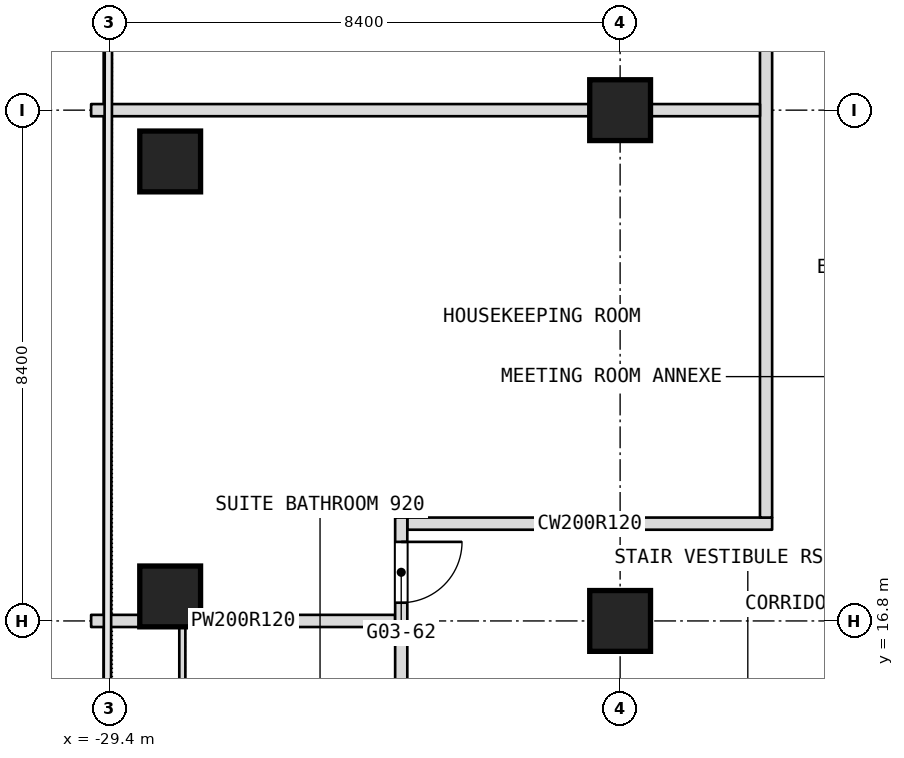
"""IFC4 building model, lengths in metres.
Left out: names, types, materials, properties, quantities, classifications, styles, units other than length and angle.
Written with IfcOpenShell. Run it as: python <this file> out.ifc"""

import sys

from ifc_helpers import new_model, si_unit, direction, frame, frame_2d, origin, origin_2d, place, context, subcontext, project, spatial, rectangle, extrude, element, fill, save


model = new_model("IFC4")
c1 = context("Model", 3, precision=1e-05, world=origin(), true_north=direction((0.0, 1.0)))
c2 = subcontext(c1, "Body", "Model", "MODEL_VIEW")
j1 = project(units=[si_unit("LENGTHUNIT", "METRE"), si_unit("PLANEANGLEUNIT", "RADIAN")], contexts=[c1])
p1 = place(None, origin())
s1 = spatial("IfcSite", under=j1, at=p1, CompositionType="ELEMENT")
p2 = place(p1, origin())
s2 = spatial("IfcBuilding", under=s1, at=p2, CompositionType="ELEMENT")
p3 = place(p2, frame((0.0, 0.0, 47.3)))
s3 = spatial("IfcBuildingStorey", under=s2, at=p3, CompositionType="ELEMENT", Elevation=47.3)
for number, where, z_axis, x_axis in (
    (1, (-21.0, 16.8, 0.0), (0.0, 0.0, 1.0), (1.0, 0.0, 0.0)),
    (2, (-21.0, 25.2, 0.0), (0.0, 0.0, 1.0), (1.0, 0.0, 0.0)),
    (3, (-28.4, 17.203, 0.0), (0.0, 0.0, 1.0), (1.0, 0.0, 0.0)),
    (4, (-28.4, 24.356, 0.0), (0.0, 0.0, 1.0), (1.0, 0.0, 0.0)),
):
    element("IfcColumn", number, at=place(p3, frame(where, z_axis=z_axis, x_axis=x_axis)), inside=s3, PredefinedType="COLUMN", context=c2, shape_type="SweptSolid", body=[
        extrude(rectangle(XDim=1.0, YDim=1.0, at=origin_2d()), origin(), (0.0, 0.0, 1.0), 3.6),
    ])
p4 = place(p3, frame((-29.7, 16.8, 0.0), z_axis=(0.0, 0.0, 1.0), x_axis=(1.0, 0.0, 0.0)))
e5 = element("IfcWall", 5, at=p4, inside=s3, PredefinedType="PARTITIONING", context=c2, shape_type="SweptSolid", body=[
    extrude(rectangle(XDim=5.0, YDim=0.2, at=frame_2d((2.5, 0.0))), origin(), (0.0, 0.0, 1.0), 2.84),
])
p5 = place(p3, frame((-24.5, 18.4, 0.0), z_axis=(0.0, 0.0, 1.0), x_axis=(1.0, 0.0, 0.0)))
e6 = element("IfcWall", 6, at=p5, inside=s3, PredefinedType="PARTITIONING", context=c2, shape_type="SweptSolid", body=[
    extrude(rectangle(XDim=6.0, YDim=0.2, at=frame_2d((3.0, 0.0))), origin(), (0.0, 0.0, 1.0), 3.34),
])
p6 = place(p3, frame((-18.6, 18.5, 0.0), z_axis=(0.0, 0.0, 1.0), x_axis=(0.0, 1.0, 0.0)))
e7 = element("IfcWall", 7, at=p6, inside=s3, PredefinedType="PARTITIONING", context=c2, shape_type="SweptSolid", body=[
    extrude(rectangle(XDim=15.04, YDim=0.2, at=frame_2d((7.52, 0.0))), origin(), (0.0, 0.0, 1.0), 3.34),
])
p7 = place(p6, frame((8.25, 0.0, 0.0)))
e8 = element("IfcOpeningElement", 8, at=p7, cuts=e7, PredefinedType="OPENING", context=c2, shape_type="SweptSolid", body=[
    extrude(rectangle(XDim=1.1, YDim=2.1, at=frame_2d((0.55, 1.05))), frame((0.0, 0.1, 0.0), z_axis=(0.0, -1.0, 0.0), x_axis=(1.0, 0.0, 0.0)), (0.0, 0.0, 1.0), 0.2),
])
p8 = place(p3, frame((-24.6, 6.9, 0.0), z_axis=(0.0, 0.0, 1.0), x_axis=(0.0, 1.0, 0.0)))
e9 = element("IfcWall", 9, at=p8, inside=s3, PredefinedType="PARTITIONING", context=c2, shape_type="SweptSolid", body=[
    extrude(rectangle(XDim=11.6, YDim=0.2, at=frame_2d((5.8, 0.0))), origin(), (0.0, 0.0, 1.0), 3.34),
])
p9 = place(p8, frame((5.1, 0.0, 0.0)))
e10 = element("IfcOpeningElement", 10, at=p9, cuts=e9, PredefinedType="OPENING", context=c2, shape_type="SweptSolid", body=[
    extrude(rectangle(XDim=1.1, YDim=2.1, at=frame_2d((0.55, 1.05))), frame((0.0, 0.1, 0.0), z_axis=(0.0, -1.0, 0.0), x_axis=(1.0, 0.0, 0.0)), (0.0, 0.0, 1.0), 0.2),
])
p10 = place(p8, frame((10.2, 0.0, 0.0)))
e11 = element("IfcOpeningElement", 11, at=p10, cuts=e9, PredefinedType="OPENING", context=c2, shape_type="SweptSolid", body=[
    extrude(rectangle(XDim=1.0, YDim=2.1, at=frame_2d((0.5, 1.05))), frame((0.0, 0.1, 0.0), z_axis=(0.0, -1.0, 0.0), x_axis=(1.0, 0.0, 0.0)), (0.0, 0.0, 1.0), 0.2),
])
p11 = place(p3, frame((-29.7, 25.2, 0.0), z_axis=(0.0, 0.0, 1.0), x_axis=(1.0, 0.0, 0.0)))
e12 = element("IfcWall", 12, at=p11, inside=s3, PredefinedType="PARTITIONING", context=c2, shape_type="SweptSolid", body=[
    extrude(rectangle(XDim=11.0, YDim=0.2, at=frame_2d((5.5, 0.0))), origin(), (0.0, 0.0, 1.0), 2.84),
])
p12 = place(p3, frame((-28.2, 13.15, 0.0), z_axis=(0.0, 0.0, 1.0), x_axis=(0.0, 1.0, 0.0)))
e13 = element("IfcWall", 13, at=p12, inside=s3, PredefinedType="PARTITIONING", context=c2, shape_type="SweptSolid", body=[
    extrude(rectangle(XDim=3.75, YDim=0.1, at=frame_2d((1.875, 0.0))), origin(), (0.0, 0.0, 1.0), 2.94),
])
p13 = place(p10, origin())
e14 = element("IfcDoor", 14, at=p13, inside=s3, OperationType="SINGLE_SWING_RIGHT", PredefinedType="DOOR", context=c2, shape_type="SweptSolid", body=[
    extrude(rectangle(XDim=1.0, YDim=2.1, at=frame_2d((0.5, 1.05))), frame((0.0, 0.025, 0.0), z_axis=(0.0, -1.0, 0.0), x_axis=(1.0, 0.0, 0.0)), (0.0, 0.0, 1.0), 0.05),
])
fill(e11, e14)
save(model, sys.argv[1])
